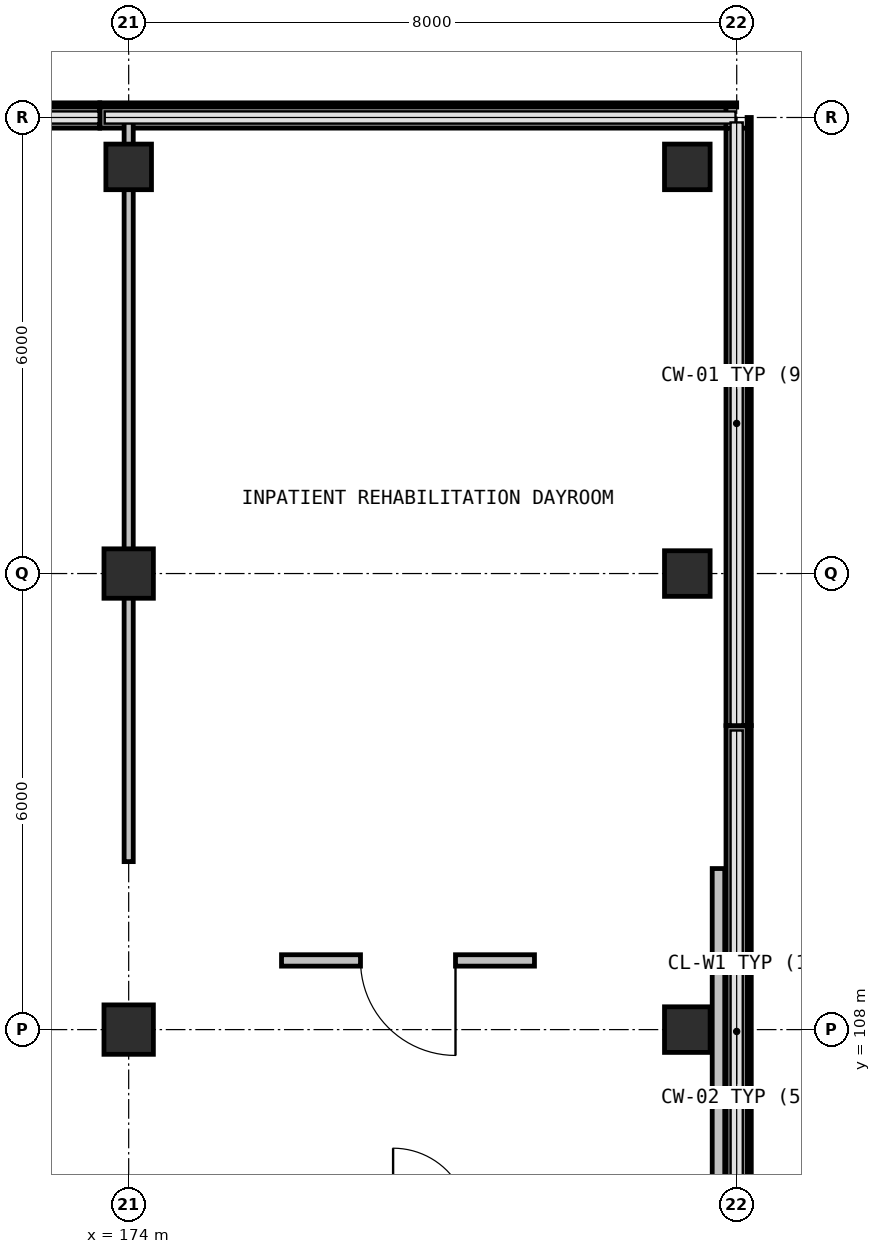
"""IFC4 building model, lengths in metres.
Left out: names, types, materials, properties, quantities, classifications, styles, units other than length and angle.
Written with IfcOpenShell. Run it as: python <this file> out.ifc"""

import sys

from ifc_helpers import new_model, si_unit, direction, frame, frame_2d, origin, origin_2d, place, context, subcontext, project, spatial, rectangle, extrude, element, fill, save


model = new_model("IFC4")
c1 = context("Model", 3, precision=1e-05, world=origin(), true_north=direction((0.0, 1.0)))
c2 = subcontext(c1, "Body", "Model", "MODEL_VIEW")
j1 = project(units=[si_unit("LENGTHUNIT", "METRE"), si_unit("PLANEANGLEUNIT", "RADIAN")], contexts=[c1])
p1 = place(None, origin())
s1 = spatial("IfcSite", under=j1, at=p1, CompositionType="ELEMENT")
p2 = place(p1, origin())
s2 = spatial("IfcBuilding", under=s1, at=p2, CompositionType="ELEMENT")
p3 = place(p2, frame((0.0, 0.0, 23.25)))
s3 = spatial("IfcBuildingStorey", under=s2, at=p3, CompositionType="ELEMENT", Elevation=23.25)
for number, where, z_axis, x_axis in (
    (1, (174.0, 119.35, 0.0), (0.0, 0.0, 1.0), (1.0, 0.0, 0.0)),
    (2, (181.35, 119.35, 0.0), (0.0, 0.0, 1.0), (1.0, 0.0, 0.0)),
):
    element("IfcColumn", number, at=place(p3, frame(where, z_axis=z_axis, x_axis=x_axis)), inside=s3, PredefinedType="COLUMN", context=c2, shape_type="SweptSolid", body=[
        extrude(rectangle(XDim=0.6, YDim=0.6, at=origin_2d()), origin(), (0.0, 0.0, 1.0), 3.775),
    ])
for number, where, z_axis, x_axis in (
    (3, (174.0, 108.0, 0.0), (0.0, 0.0, 1.0), (1.0, 0.0, 0.0)),
    (4, (174.0, 114.0, 0.0), (0.0, 0.0, 1.0), (1.0, 0.0, 0.0)),
):
    element("IfcColumn", number, at=place(p3, frame(where, z_axis=z_axis, x_axis=x_axis)), inside=s3, PredefinedType="COLUMN", context=c2, shape_type="SweptSolid", body=[
        extrude(rectangle(XDim=0.65, YDim=0.65, at=origin_2d()), origin(), (0.0, 0.0, 1.0), 4.05),
    ])
for number, where, z_axis, x_axis in (
    (5, (181.35, 108.0, 0.0), (0.0, 0.0, 1.0), (1.0, 0.0, 0.0)),
    (6, (181.35, 114.0, 0.0), (0.0, 0.0, 1.0), (1.0, 0.0, 0.0)),
):
    element("IfcColumn", number, at=place(p3, frame(where, z_axis=z_axis, x_axis=x_axis)), inside=s3, PredefinedType="COLUMN", context=c2, shape_type="SweptSolid", body=[
        extrude(rectangle(XDim=0.6, YDim=0.6, at=origin_2d()), origin(), (0.0, 0.0, 1.0), 4.05),
    ])
p4 = place(p3, frame((165.243, 120.0, 0.0), z_axis=(0.0, 0.0, 1.0), x_axis=(1.0, 0.0, 0.0)))
e7 = element("IfcWall", 7, at=p4, inside=s3, PredefinedType="SOLIDWALL", context=c2, shape_type="SweptSolid", body=[
    extrude(rectangle(XDim=8.375, YDim=0.28, at=frame_2d((4.188, 0.0))), origin(), (0.0, 0.0, 1.0), 0.94),
])
p5 = place(p3, frame((173.622, 120.0, 0.0), z_axis=(0.0, 0.0, 1.0), x_axis=(1.0, 0.0, 0.0)))
e8 = element("IfcWall", 8, at=p5, inside=s3, PredefinedType="SOLIDWALL", context=c2, shape_type="SweptSolid", body=[
    extrude(rectangle(XDim=8.237, YDim=0.28, at=frame_2d((4.118, 0.0))), origin(), (0.0, 0.0, 1.0), 0.94),
])
p6 = place(p3, frame((181.999, 119.86, 0.0), z_axis=(0.0, 0.0, 1.0), x_axis=(0.0, -1.0, 0.0)))
e9 = element("IfcWall", 9, at=p6, inside=s3, PredefinedType="SOLIDWALL", context=c2, shape_type="SweptSolid", body=[
    extrude(rectangle(XDim=7.858, YDim=0.28, at=frame_2d((3.929, 0.0))), origin(), (0.0, 0.0, 1.0), 0.94),
])
p7 = place(p3, frame((181.999, 111.998, 0.0), z_axis=(0.0, 0.0, 1.0), x_axis=(0.000122144863, -0.99999999254, 0.0)))
e10 = element("IfcWall", 10, at=p7, inside=s3, PredefinedType="SOLIDWALL", context=c2, shape_type="SweptSolid", body=[
    extrude(rectangle(XDim=7.995, YDim=0.28, at=frame_2d((3.998, 0.0))), origin(), (0.0, 0.0, 1.0), 0.94),
])
p8 = place(p3, frame((181.76, 105.526, 0.0), z_axis=(0.0, 0.0, 1.0), x_axis=(0.0, 1.0, 0.0)))
e11 = element("IfcWall", 11, at=p8, inside=s3, PredefinedType="PARTITIONING", context=c2, shape_type="SweptSolid", body=[
    extrude(rectangle(XDim=1.574, YDim=0.165, at=frame_2d((0.787, 0.0))), origin(), (0.0, 0.0, 1.0), 3.775),
])
p9 = place(p3, frame((174.0, 119.958, 0.0), z_axis=(0.0, 0.0, 1.0), x_axis=(0.0, -1.0, 0.0)))
e12 = element("IfcWall", 12, at=p9, inside=s3, PredefinedType="PARTITIONING", context=c2, shape_type="SweptSolid", body=[
    extrude(rectangle(XDim=9.748, YDim=0.12, at=frame_2d((4.874, 0.0))), origin(), (0.0, 0.0, 1.0), 3.175),
])
p10 = place(p3, frame((181.76, 107.1, 0.0), z_axis=(0.0, 0.0, 1.0), x_axis=(0.0, 1.0, 0.0)))
e13 = element("IfcWall", 13, at=p10, inside=s3, PredefinedType="PARTITIONING", context=c2, shape_type="SweptSolid", body=[
    extrude(rectangle(XDim=3.019, YDim=0.165, at=frame_2d((1.509, 0.0))), origin(), (0.0, 0.0, 1.0), 3.775),
])
p11 = place(p3, frame((179.339, 108.91, 0.0), z_axis=(0.0, 0.0, 1.0), x_axis=(-1.0, 0.0, 0.0)))
e14 = element("IfcWall", 14, at=p11, inside=s3, PredefinedType="PARTITIONING", context=c2, shape_type="SweptSolid", body=[
    extrude(rectangle(XDim=3.328, YDim=0.15, at=frame_2d((1.664, 0.0))), origin(), (0.0, 0.0, 1.0), 3.775),
])
p12 = place(p11, frame((1.039, 0.0, 0.0)))
e15 = element("IfcOpeningElement", 15, at=p12, cuts=e14, PredefinedType="OPENING", context=c2, shape_type="SweptSolid", body=[
    extrude(rectangle(XDim=1.25, YDim=2.15, at=frame_2d((0.625, 1.075))), frame((0.0, 0.085, 0.0), z_axis=(0.0, -1.0, 0.0), x_axis=(1.0, 0.0, 0.0)), (0.0, 0.0, 1.0), 0.17),
])
p13 = place(p12, origin())
e16 = element("IfcDoor", 16, at=p13, inside=s3, OperationType="SINGLE_SWING_LEFT", PredefinedType="DOOR", context=c2, shape_type="SweptSolid", body=[
    extrude(rectangle(XDim=1.25, YDim=2.15, at=frame_2d((0.625, 1.075))), frame((0.0, 0.025, 0.0), z_axis=(0.0, -1.0, 0.0), x_axis=(1.0, 0.0, 0.0)), (0.0, 0.0, 1.0), 0.05),
])
fill(e15, e16)
save(model, sys.argv[1])
